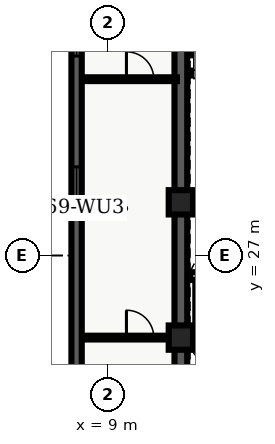
"""IFC4 building model, lengths in metres.
Left out: names, types, materials, properties, quantities, classifications, styles, units other than length and angle.
Written with IfcOpenShell. Run it as: python <this file> out.ifc"""

import sys

from ifc_helpers import new_model, entity, si_unit, converted_unit, direction, frame, origin_with_axes, origin_2d_with_axis, place, context, subcontext, project, spatial, polyline, rectangle, outline, extrude, element, fill, save


model = new_model("IFC4")
c1 = context("Model", 3, precision=1e-05, world=origin_with_axes(), true_north=direction((0.0, 1.0)))
c2 = subcontext(c1, "Body", "Model", "MODEL_VIEW")
j1 = project(units=[si_unit("LENGTHUNIT", "METRE"), converted_unit("PLANEANGLEUNIT", "DEGREE", entity("IfcPlaneAngleMeasure", 0.017), si_unit("PLANEANGLEUNIT", "RADIAN"), dimensions=[0, 0, 0, 0, 0, 0, 0])], contexts=[c1])
p1 = place(None, origin_with_axes())
s1 = spatial("IfcSite", under=j1, at=p1, CompositionType="ELEMENT")
p2 = place(p1, origin_with_axes())
s2 = spatial("IfcBuilding", under=s1, at=p2, CompositionType="ELEMENT")
p3 = place(p2, frame((0.0, 0.0, 280.2), z_axis=(0.0, 0.0, 1.0), x_axis=(1.0, 0.0, 0.0)))
s3 = spatial("IfcBuildingStorey", under=s2, at=p3, CompositionType="ELEMENT", Elevation=280.2)
p4 = place(p3, frame((11.4, 10.8, 0.0), z_axis=(0.0, 0.0, 1.0), x_axis=(0.0, 1.0, 0.0)))
e1 = element("IfcWall", 1, at=p4, inside=s3, PredefinedType="SHEAR", context=c2, shape_type="SweptSolid", body=[
    extrude(outline(polyline([(0.0, -0.21), (27.0, -0.21), (27.0, 0.21), (0.0, 0.21), (0.0, -0.21)])), origin_with_axes(), (0.0, 0.0, 1.0), 3.66),
])
p5 = place(p3, frame((11.61, 28.775, 0.0), z_axis=(0.0, 0.0, 1.0), x_axis=(1.0, 0.0, 0.0)))
e2 = element("IfcWall", 2, at=p5, inside=s3, PredefinedType="SHEAR", context=c2, shape_type="SweptSolid", body=[
    extrude(outline(polyline([(0.0, -0.125), (6.78, -0.125), (6.78, 0.125), (0.0, 0.125), (0.0, -0.125)])), origin_with_axes(), (0.0, 0.0, 1.0), 3.66),
])
p6 = place(p3, frame((11.7, 24.1, 0.0), z_axis=(0.0, 0.0, 1.0), x_axis=(1.0, 0.0, 0.0)))
e3 = element("IfcWall", 3, at=p6, inside=s3, PredefinedType="SOLIDWALL", context=c2, shape_type="SweptSolid", body=[
    extrude(outline(polyline([(0.0, -0.125), (6.6, -0.125), (6.6, 0.125), (0.0, 0.125), (0.0, -0.125)])), origin_with_axes(), (0.0, 0.0, 1.0), 2.7),
])
p7 = place(p6, frame((3.75, 0.0, 0.0), z_axis=(0.0, 0.0, 1.0), x_axis=(1.0, 0.0, 0.0)))
e4 = element("IfcOpeningElement", 4, at=p7, cuts=e3, PredefinedType="OPENING", context=c2, shape_type="SweptSolid", body=[
    extrude(rectangle(XDim=0.9, YDim=0.27, at=origin_2d_with_axis()), origin_with_axes(), (0.0, 0.0, 1.0), 2.15),
])
p8 = place(p3, frame((11.7, 26.325, 0.0), z_axis=(0.0, 0.0, 1.0), x_axis=(1.0, 0.0, 0.0)))
e5 = element("IfcWall", 5, at=p8, inside=s3, PredefinedType="SOLIDWALL", context=c2, shape_type="SweptSolid", body=[
    extrude(outline(polyline([(0.0, -0.125), (6.6, -0.125), (6.6, 0.125), (0.0, 0.125), (0.0, -0.125)])), origin_with_axes(), (0.0, 0.0, 1.0), 2.7),
])
p9 = place(p8, frame((3.5, 0.0, 0.0), z_axis=(0.0, 0.0, 1.0), x_axis=(1.0, 0.0, 0.0)))
e6 = element("IfcOpeningElement", 6, at=p9, cuts=e5, PredefinedType="OPENING", context=c2, shape_type="SweptSolid", body=[
    extrude(rectangle(XDim=0.9, YDim=0.27, at=origin_2d_with_axis()), origin_with_axes(), (0.0, 0.0, 1.0), 2.15),
])
for number, where, z_axis, x_axis in (
    (7, (11.4, 24.3, 0.0), (0.0, 0.0, 1.0), (1.0, 0.0, 0.0)),
    (8, (11.4, 28.75, 0.0), (0.0, 0.0, 1.0), (1.0, 0.0, 0.0)),
):
    element("IfcColumn", number, at=place(p3, frame(where, z_axis=z_axis, x_axis=x_axis)), inside=s3, PredefinedType="COLUMN", context=c2, shape_type="SweptSolid", body=[
        extrude(rectangle(XDim=0.8, YDim=0.8, at=origin_2d_with_axis()), origin_with_axes(), (0.0, 0.0, 1.0), 3.9),
    ])
p10 = place(p3, frame((8.135, 24.3, 0.0), z_axis=(0.0, 0.0, 1.0), x_axis=(1.0, 0.0, 0.0)))
e9 = element("IfcWall", 9, at=p10, inside=s3, PredefinedType="PARTITIONING", context=c2, shape_type="SweptSolid", body=[
    extrude(outline(polyline([(0.0, -0.062), (3.135, -0.062), (3.135, 0.062), (0.0, 0.062), (0.0, -0.062)])), origin_with_axes(), (0.0, 0.0, 1.0), 2.7),
])
p11 = place(p10, frame((1.925, 0.0, 0.0), z_axis=(0.0, 0.0, 1.0), x_axis=(1.0, 0.0, 0.0)))
e10 = element("IfcOpeningElement", 10, at=p11, cuts=e9, PredefinedType="OPENING", context=c2, shape_type="SweptSolid", body=[
    extrude(rectangle(XDim=0.9, YDim=0.145, at=origin_2d_with_axis()), origin_with_axes(), (0.0, 0.0, 1.0), 2.15),
])
p12 = place(p3, frame((8.135, 32.8, 0.0), z_axis=(0.0, 0.0, 1.0), x_axis=(1.0, 0.0, 0.0)))
e11 = element("IfcWall", 11, at=p12, inside=s3, PredefinedType="PARTITIONING", context=c2, shape_type="SweptSolid", body=[
    extrude(outline(polyline([(0.0, -0.062), (3.135, -0.062), (3.135, 0.062), (0.0, 0.062), (0.0, -0.062)])), origin_with_axes(), (0.0, 0.0, 1.0), 2.7),
])
p13 = place(p12, frame((1.925, 0.0, 0.0), z_axis=(0.0, 0.0, 1.0), x_axis=(1.0, 0.0, 0.0)))
e12 = element("IfcOpeningElement", 12, at=p13, cuts=e11, PredefinedType="OPENING", context=c2, shape_type="SweptSolid", body=[
    extrude(rectangle(XDim=0.9, YDim=0.145, at=origin_2d_with_axis()), origin_with_axes(), (0.0, 0.0, 1.0), 2.15),
])
p14 = place(p3, frame((7.97, 2.74, 0.0), z_axis=(0.0, 0.0, 1.0), x_axis=(0.0, 1.0, 0.0)))
e13 = element("IfcWall", 13, at=p14, inside=s3, PredefinedType="SOLIDWALL", context=c2, shape_type="SweptSolid", body=[
    extrude(outline(polyline([(0.0, -0.17), (43.46, -0.17), (43.46, 0.17), (0.0, 0.17), (0.0, -0.17)])), origin_with_axes(), (0.0, 0.0, 1.0), 3.66),
])
p15 = place(p14, frame((2.948, 0.0, 0.45), z_axis=(0.0, 0.0, 1.0), x_axis=(1.0, 0.0, 0.0)))
e14 = element("IfcOpeningElement", 14, at=p15, cuts=e13, PredefinedType="OPENING", context=c2, shape_type="SweptSolid", body=[
    extrude(rectangle(XDim=1.5, YDim=0.36, at=origin_2d_with_axis()), origin_with_axes(), (0.0, 0.0, 1.0), 2.1),
])
p16 = place(p14, frame((7.643, 0.0, 0.45), z_axis=(0.0, 0.0, 1.0), x_axis=(1.0, 0.0, 0.0)))
e15 = element("IfcOpeningElement", 15, at=p16, cuts=e13, PredefinedType="OPENING", context=c2, shape_type="SweptSolid", body=[
    extrude(rectangle(XDim=1.5, YDim=0.36, at=origin_2d_with_axis()), origin_with_axes(), (0.0, 0.0, 1.0), 2.1),
])
p17 = place(p14, frame((17.034, 0.0, 0.45), z_axis=(0.0, 0.0, 1.0), x_axis=(1.0, 0.0, 0.0)))
e16 = element("IfcOpeningElement", 16, at=p17, cuts=e13, PredefinedType="OPENING", context=c2, shape_type="SweptSolid", body=[
    extrude(rectangle(XDim=1.5, YDim=0.36, at=origin_2d_with_axis()), origin_with_axes(), (0.0, 0.0, 1.0), 2.1),
])
p18 = place(p14, frame((26.426, 0.0, 0.45), z_axis=(0.0, 0.0, 1.0), x_axis=(1.0, 0.0, 0.0)))
e17 = element("IfcOpeningElement", 17, at=p18, cuts=e13, PredefinedType="OPENING", context=c2, shape_type="SweptSolid", body=[
    extrude(rectangle(XDim=1.5, YDim=0.36, at=origin_2d_with_axis()), origin_with_axes(), (0.0, 0.0, 1.0), 2.1),
])
p19 = place(p14, frame((31.571, 0.0, 0.45), z_axis=(0.0, 0.0, 1.0), x_axis=(1.0, 0.0, 0.0)))
e18 = element("IfcOpeningElement", 18, at=p19, cuts=e13, PredefinedType="OPENING", context=c2, shape_type="SweptSolid", body=[
    extrude(rectangle(XDim=1.5, YDim=0.36, at=origin_2d_with_axis()), origin_with_axes(), (0.0, 0.0, 1.0), 2.1),
])
p20 = place(p14, frame((35.817, 0.0, 0.45), z_axis=(0.0, 0.0, 1.0), x_axis=(1.0, 0.0, 0.0)))
e19 = element("IfcOpeningElement", 19, at=p20, cuts=e13, PredefinedType="OPENING", context=c2, shape_type="SweptSolid", body=[
    extrude(rectangle(XDim=1.5, YDim=0.36, at=origin_2d_with_axis()), origin_with_axes(), (0.0, 0.0, 1.0), 2.1),
])
p21 = place(p14, frame((40.512, 0.0, 0.45), z_axis=(0.0, 0.0, 1.0), x_axis=(1.0, 0.0, 0.0)))
e20 = element("IfcOpeningElement", 20, at=p21, cuts=e13, PredefinedType="OPENING", context=c2, shape_type="SweptSolid", body=[
    extrude(rectangle(XDim=1.5, YDim=0.36, at=origin_2d_with_axis()), origin_with_axes(), (0.0, 0.0, 1.0), 2.1),
])
p22 = place(p10, frame((1.925, 0.0, 0.0), z_axis=(0.0, 0.0, 1.0), x_axis=(1.0, 0.0, 0.0)))
e21 = element("IfcDoor", 21, at=p22, inside=s3, OperationType="SINGLE_SWING_LEFT", PredefinedType="DOOR", context=c2, shape_type="SweptSolid", body=[
    extrude(rectangle(XDim=0.9, YDim=0.075, at=origin_2d_with_axis()), origin_with_axes(), (0.0, 0.0, 1.0), 2.15),
])
fill(e10, e21)
p23 = place(p12, frame((1.925, 0.0, 0.0), z_axis=(0.0, 0.0, 1.0), x_axis=(1.0, 0.0, 0.0)))
e22 = element("IfcDoor", 22, at=p23, inside=s3, OperationType="SINGLE_SWING_LEFT", PredefinedType="DOOR", context=c2, shape_type="SweptSolid", body=[
    extrude(rectangle(XDim=0.9, YDim=0.075, at=origin_2d_with_axis()), origin_with_axes(), (0.0, 0.0, 1.0), 2.15),
])
fill(e12, e22)
p24 = place(p14, frame((26.426, 0.0, 0.45), z_axis=(0.0, 0.0, 1.0), x_axis=(1.0, 0.0, 0.0)))
e23 = element("IfcWindow", 23, at=p24, inside=s3, PredefinedType="WINDOW", context=c2, shape_type="SweptSolid", body=[
    extrude(rectangle(XDim=1.5, YDim=0.09, at=origin_2d_with_axis()), origin_with_axes(), (0.0, 0.0, 1.0), 2.1),
])
fill(e17, e23)
p25 = place(p14, frame((31.571, 0.0, 0.45), z_axis=(0.0, 0.0, 1.0), x_axis=(1.0, 0.0, 0.0)))
e24 = element("IfcWindow", 24, at=p25, inside=s3, PredefinedType="WINDOW", context=c2, shape_type="SweptSolid", body=[
    extrude(rectangle(XDim=1.5, YDim=0.09, at=origin_2d_with_axis()), origin_with_axes(), (0.0, 0.0, 1.0), 2.1),
])
fill(e18, e24)
save(model, sys.argv[1])
